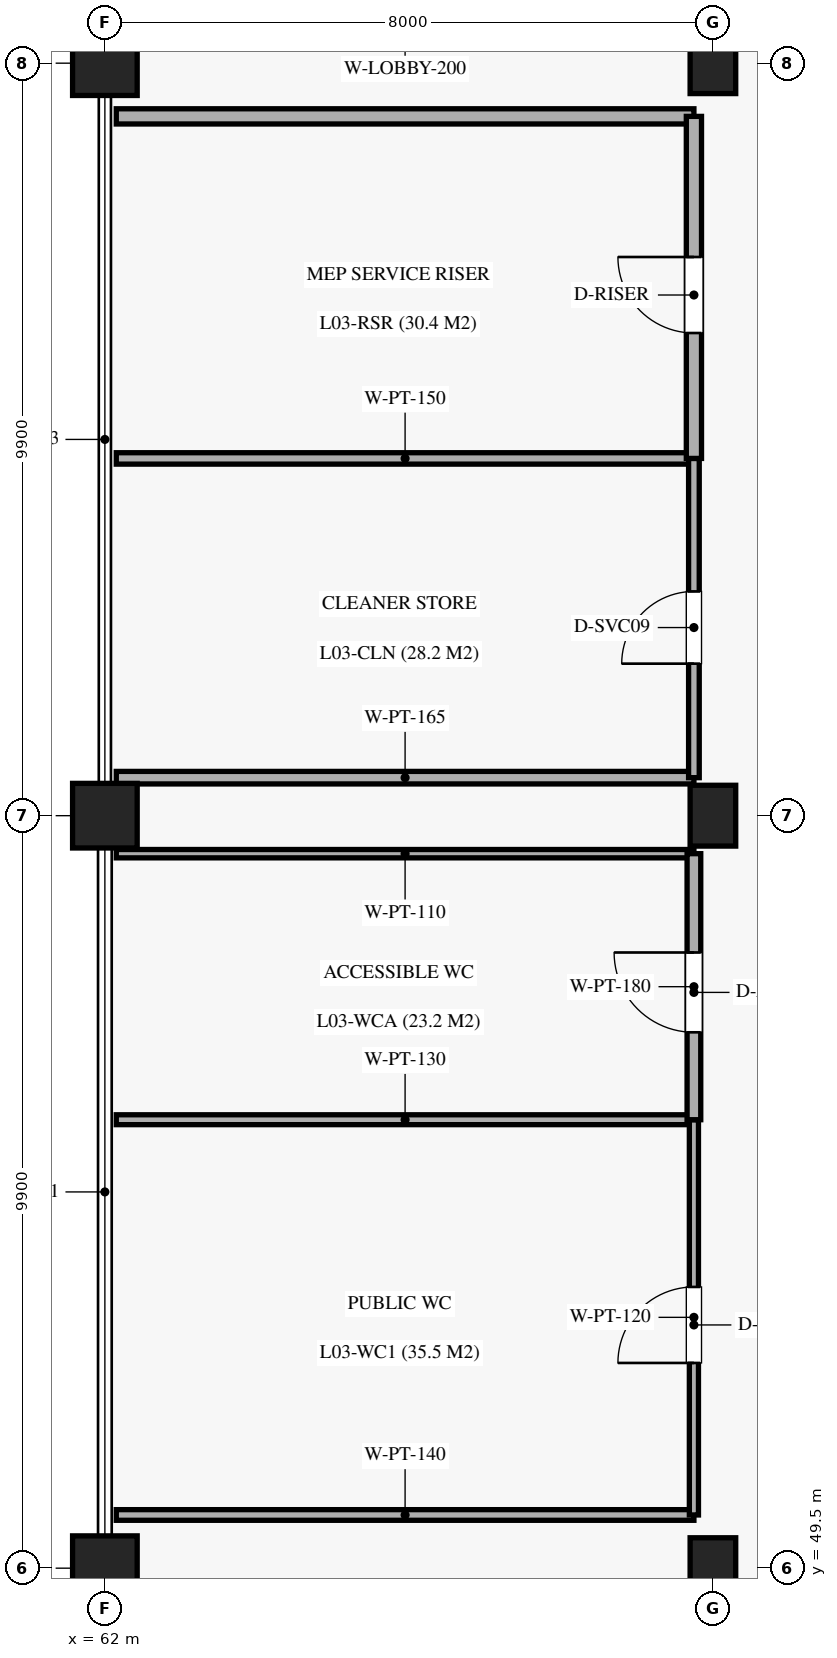
"""IFC4 building model, lengths in metres.
Left out: names, types, materials, properties, quantities, classifications, styles, units other than length and angle.
Written with IfcOpenShell. Run it as: python <this file> out.ifc"""

import sys

from ifc_helpers import new_model, si_unit, direction, frame, frame_2d, origin, origin_2d, place, context, subcontext, project, spatial, rectangle, extrude, element, fill, save


model = new_model("IFC4")
c1 = context("Model", 3, precision=1e-05, world=origin(), true_north=direction((0.0, 1.0)))
c2 = subcontext(c1, "Body", "Model", "MODEL_VIEW")
j1 = project(units=[si_unit("LENGTHUNIT", "METRE"), si_unit("PLANEANGLEUNIT", "RADIAN")], contexts=[c1])
p1 = place(None, origin())
s1 = spatial("IfcSite", under=j1, at=p1, CompositionType="ELEMENT")
p2 = place(p1, origin())
s2 = spatial("IfcBuilding", under=s1, at=p2, CompositionType="ELEMENT")
p3 = place(p2, frame((0.0, 0.0, 16.32)))
s3 = spatial("IfcBuildingStorey", under=s2, at=p3, CompositionType="ELEMENT", Elevation=16.32)
for number, where, z_axis, x_axis in (
    (1, (62.0, 49.5, 0.0), (0.0, 0.0, 1.0), (1.0, 0.0, 0.0)),
    (2, (62.0, 59.4, 0.0), (0.0, 0.0, 1.0), (1.0, 0.0, 0.0)),
    (3, (62.0, 69.3, 0.0), (0.0, 0.0, 1.0), (1.0, 0.0, 0.0)),
):
    element("IfcColumn", number, at=place(p3, frame(where, z_axis=z_axis, x_axis=x_axis)), inside=s3, PredefinedType="COLUMN", context=c2, shape_type="SweptSolid", body=[
        extrude(rectangle(XDim=0.85, YDim=0.85, at=origin_2d()), origin(), (0.0, 0.0, 1.0), 6.12),
    ])
for number, where, z_axis, x_axis in (
    (4, (70.0, 49.5, 0.0), (0.0, 0.0, 1.0), (1.0, 0.0, 0.0)),
    (5, (70.0, 59.4, 0.0), (0.0, 0.0, 1.0), (1.0, 0.0, 0.0)),
    (6, (70.0, 69.3, 0.0), (0.0, 0.0, 1.0), (1.0, 0.0, 0.0)),
):
    element("IfcColumn", number, at=place(p3, frame(where, z_axis=z_axis, x_axis=x_axis)), inside=s3, PredefinedType="COLUMN", context=c2, shape_type="SweptSolid", body=[
        extrude(rectangle(XDim=0.6, YDim=0.8, at=origin_2d()), origin(), (0.0, 0.0, 1.0), 6.12),
    ])
p4 = place(p3, frame((62.15, 50.2, 0.0), z_axis=(0.0, 0.0, 1.0), x_axis=(1.0, 0.0, 0.0)))
e7 = element("IfcWall", 7, at=p4, inside=s3, PredefinedType="PARTITIONING", context=c2, shape_type="SweptSolid", body=[
    extrude(rectangle(XDim=7.6, YDim=0.14, at=frame_2d((3.8, 0.0))), origin(), (0.0, 0.0, 1.0), 4.98),
])
p5 = place(p3, frame((62.15, 55.4, 0.0), z_axis=(0.0, 0.0, 1.0), x_axis=(1.0, 0.0, 0.0)))
e8 = element("IfcWall", 8, at=p5, inside=s3, PredefinedType="PARTITIONING", context=c2, shape_type="SweptSolid", body=[
    extrude(rectangle(XDim=7.6, YDim=0.13, at=frame_2d((3.8, 0.0))), origin(), (0.0, 0.0, 1.0), 4.98),
])
p6 = place(p3, frame((69.75, 50.2, 0.0), z_axis=(0.0, 0.0, 1.0), x_axis=(0.0, 1.0, 0.0)))
e9 = element("IfcWall", 9, at=p6, inside=s3, PredefinedType="PARTITIONING", context=c2, shape_type="SweptSolid", body=[
    extrude(rectangle(XDim=5.2, YDim=0.12, at=frame_2d((2.6, 0.0))), origin(), (0.0, 0.0, 1.0), 4.98),
])
p7 = place(p6, frame((2.0, 0.0, 0.0)))
e10 = element("IfcOpeningElement", 10, at=p7, cuts=e9, PredefinedType="OPENING", context=c2, shape_type="SweptSolid", body=[
    extrude(rectangle(XDim=1.0, YDim=2.1, at=frame_2d((0.5, 1.05))), frame((0.0, 0.07, 0.0), z_axis=(0.0, -1.0, 0.0), x_axis=(1.0, 0.0, 0.0)), (0.0, 0.0, 1.0), 0.14),
])
p8 = place(p3, frame((62.15, 58.9, 0.0), z_axis=(0.0, 0.0, 1.0), x_axis=(1.0, 0.0, 0.0)))
e11 = element("IfcWall", 11, at=p8, inside=s3, PredefinedType="PARTITIONING", context=c2, shape_type="SweptSolid", body=[
    extrude(rectangle(XDim=7.6, YDim=0.11, at=frame_2d((3.8, 0.0))), origin(), (0.0, 0.0, 1.0), 4.98),
])
p9 = place(p3, frame((69.75, 55.4, 0.0), z_axis=(0.0, 0.0, 1.0), x_axis=(0.0, 1.0, 0.0)))
e12 = element("IfcWall", 12, at=p9, inside=s3, PredefinedType="PARTITIONING", context=c2, shape_type="SweptSolid", body=[
    extrude(rectangle(XDim=3.5, YDim=0.18, at=frame_2d((1.75, 0.0))), origin(), (0.0, 0.0, 1.0), 4.98),
])
p10 = place(p9, frame((1.15, 0.0, 0.0)))
e13 = element("IfcOpeningElement", 13, at=p10, cuts=e12, PredefinedType="OPENING", context=c2, shape_type="SweptSolid", body=[
    extrude(rectangle(XDim=1.05, YDim=2.15, at=frame_2d((0.525, 1.075))), frame((0.0, 0.1, 0.0), z_axis=(0.0, -1.0, 0.0), x_axis=(1.0, 0.0, 0.0)), (0.0, 0.0, 1.0), 0.2),
])
p11 = place(p3, frame((62.15, 59.9, 0.0), z_axis=(0.0, 0.0, 1.0), x_axis=(1.0, 0.0, 0.0)))
e14 = element("IfcWall", 14, at=p11, inside=s3, PredefinedType="PARTITIONING", context=c2, shape_type="SweptSolid", body=[
    extrude(rectangle(XDim=7.6, YDim=0.165, at=frame_2d((3.8, 0.0))), origin(), (0.0, 0.0, 1.0), 4.98),
])
p12 = place(p3, frame((62.15, 64.1, 0.0), z_axis=(0.0, 0.0, 1.0), x_axis=(1.0, 0.0, 0.0)))
e15 = element("IfcWall", 15, at=p12, inside=s3, PredefinedType="PARTITIONING", context=c2, shape_type="SweptSolid", body=[
    extrude(rectangle(XDim=7.6, YDim=0.15, at=frame_2d((3.8, 0.0))), origin(), (0.0, 0.0, 1.0), 4.98),
])
p13 = place(p3, frame((69.75, 59.9, 0.0), z_axis=(0.0, 0.0, 1.0), x_axis=(0.0, 1.0, 0.0)))
e16 = element("IfcWall", 16, at=p13, inside=s3, PredefinedType="PARTITIONING", context=c2, shape_type="SweptSolid", body=[
    extrude(rectangle(XDim=4.2, YDim=0.14, at=frame_2d((2.1, 0.0))), origin(), (0.0, 0.0, 1.0), 4.98),
])
p14 = place(p13, frame((1.5, 0.0, 0.0)))
e17 = element("IfcOpeningElement", 17, at=p14, cuts=e16, PredefinedType="OPENING", context=c2, shape_type="SweptSolid", body=[
    extrude(rectangle(XDim=0.95, YDim=2.1, at=frame_2d((0.475, 1.05))), frame((0.0, 0.08, 0.0), z_axis=(0.0, -1.0, 0.0), x_axis=(1.0, 0.0, 0.0)), (0.0, 0.0, 1.0), 0.16),
])
p15 = place(p3, frame((62.15, 68.6, 0.0), z_axis=(0.0, 0.0, 1.0), x_axis=(1.0, 0.0, 0.0)))
e18 = element("IfcWall", 18, at=p15, inside=s3, PredefinedType="SOLIDWALL", context=c2, shape_type="SweptSolid", body=[
    extrude(rectangle(XDim=7.6, YDim=0.2, at=frame_2d((3.8, 0.0))), origin(), (0.0, 0.0, 1.0), 4.98),
])
p16 = place(p3, frame((69.75, 64.1, 0.0), z_axis=(0.0, 0.0, 1.0), x_axis=(0.0, 1.0, 0.0)))
e19 = element("IfcWall", 19, at=p16, inside=s3, PredefinedType="SOLIDWALL", context=c2, shape_type="SweptSolid", body=[
    extrude(rectangle(XDim=4.5, YDim=0.2, at=frame_2d((2.25, 0.0))), origin(), (0.0, 0.0, 1.0), 4.98),
])
p17 = place(p16, frame((1.65, 0.0, 0.0)))
e20 = element("IfcOpeningElement", 20, at=p17, cuts=e19, PredefinedType="OPENING", context=c2, shape_type="SweptSolid", body=[
    extrude(rectangle(XDim=1.0, YDim=2.15, at=frame_2d((0.5, 1.075))), frame((0.0, 0.11, 0.0), z_axis=(0.0, -1.0, 0.0), x_axis=(1.0, 0.0, 0.0)), (0.0, 0.0, 1.0), 0.22),
])
p18 = place(p7, origin())
e21 = element("IfcDoor", 21, at=p18, inside=s3, OperationType="SINGLE_SWING_LEFT", PredefinedType="DOOR", context=c2, shape_type="SweptSolid", body=[
    extrude(rectangle(XDim=1.0, YDim=2.1, at=frame_2d((0.5, 1.05))), frame((0.0, 0.025, 0.0), z_axis=(0.0, -1.0, 0.0), x_axis=(1.0, 0.0, 0.0)), (0.0, 0.0, 1.0), 0.05),
])
fill(e10, e21)
p19 = place(p10, origin())
e22 = element("IfcDoor", 22, at=p19, inside=s3, OperationType="SINGLE_SWING_RIGHT", PredefinedType="DOOR", context=c2, shape_type="SweptSolid", body=[
    extrude(rectangle(XDim=1.05, YDim=2.15, at=frame_2d((0.525, 1.075))), frame((0.0, 0.025, 0.0), z_axis=(0.0, -1.0, 0.0), x_axis=(1.0, 0.0, 0.0)), (0.0, 0.0, 1.0), 0.05),
])
fill(e13, e22)
p20 = place(p14, origin())
e23 = element("IfcDoor", 23, at=p20, inside=s3, OperationType="SINGLE_SWING_LEFT", PredefinedType="DOOR", context=c2, shape_type="SweptSolid", body=[
    extrude(rectangle(XDim=0.95, YDim=2.1, at=frame_2d((0.475, 1.05))), frame((0.0, 0.025, 0.0), z_axis=(0.0, -1.0, 0.0), x_axis=(1.0, 0.0, 0.0)), (0.0, 0.0, 1.0), 0.05),
])
fill(e17, e23)
p21 = place(p17, origin())
e24 = element("IfcDoor", 24, at=p21, inside=s3, OperationType="SINGLE_SWING_RIGHT", PredefinedType="DOOR", context=c2, shape_type="SweptSolid", body=[
    extrude(rectangle(XDim=1.0, YDim=2.15, at=frame_2d((0.5, 1.075))), frame((0.0, 0.025, 0.0), z_axis=(0.0, -1.0, 0.0), x_axis=(1.0, 0.0, 0.0)), (0.0, 0.0, 1.0), 0.05),
])
fill(e20, e24)
save(model, sys.argv[1])
